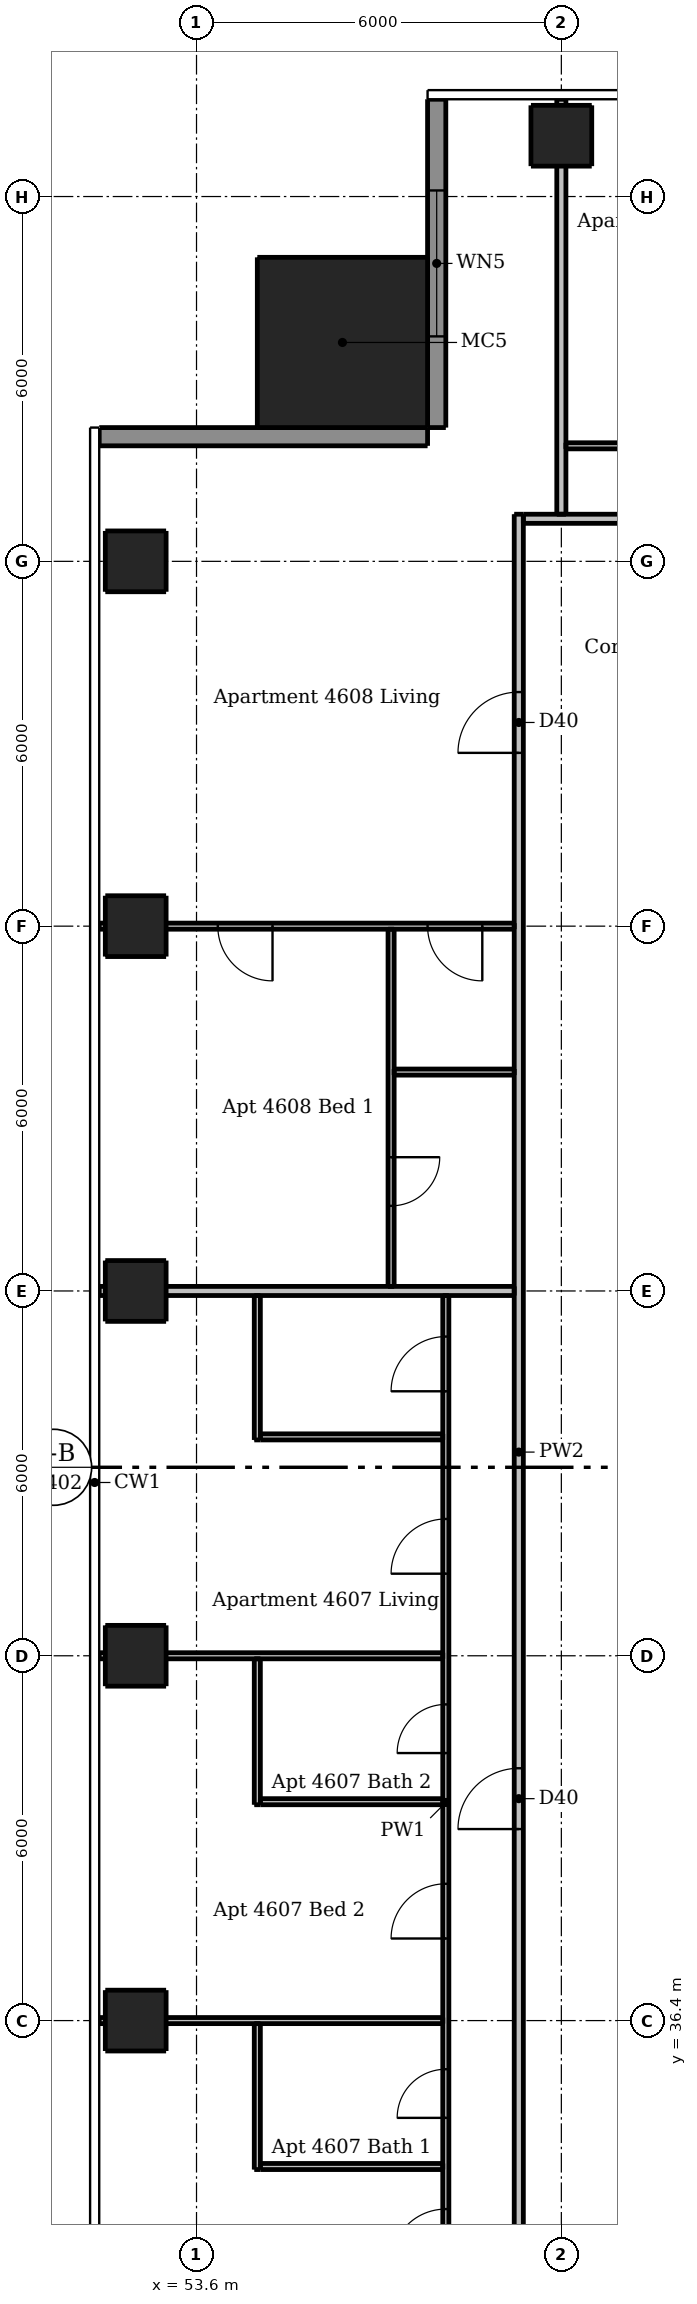
"""IFC4 building model, lengths in metres.
Left out: names, types, materials, properties, quantities, classifications, styles, units other than length and angle.
Written with IfcOpenShell. Run it as: python <this file> out.ifc"""

import sys

from ifc_helpers import new_model, si_unit, direction, frame, frame_2d, origin, origin_2d, place, context, subcontext, project, spatial, rectangle, extrude, element, fill, save


model = new_model("IFC4")
c1 = context("Model", 3, precision=1e-05, world=origin(), true_north=direction((0.0, 1.0)))
c2 = subcontext(c1, "Body", "Model", "MODEL_VIEW")
j1 = project(units=[si_unit("LENGTHUNIT", "METRE"), si_unit("PLANEANGLEUNIT", "RADIAN")], contexts=[c1])
p1 = place(None, origin())
s1 = spatial("IfcSite", under=j1, at=p1, CompositionType="ELEMENT")
p2 = place(p1, origin())
s2 = spatial("IfcBuilding", under=s1, at=p2, CompositionType="ELEMENT")
p3 = place(p2, frame((0.0, 0.0, 171.4)))
s3 = spatial("IfcBuildingStorey", under=s2, at=p3, CompositionType="ELEMENT", Elevation=171.4)
for number, where, z_axis, x_axis in (
    (1, (59.6, 67.4, 0.0), (0.0, 0.0, 1.0), (1.0, 0.0, 0.0)),
    (2, (52.6, 36.4, 0.0), (0.0, 0.0, 1.0), (1.0, 0.0, 0.0)),
    (3, (52.6, 42.4, 0.0), (0.0, 0.0, 1.0), (1.0, 0.0, 0.0)),
    (4, (52.6, 48.4, 0.0), (0.0, 0.0, 1.0), (1.0, 0.0, 0.0)),
    (5, (52.6, 54.4, 0.0), (0.0, 0.0, 1.0), (1.0, 0.0, 0.0)),
    (6, (52.6, 60.4, 0.0), (0.0, 0.0, 1.0), (1.0, 0.0, 0.0)),
):
    element("IfcColumn", number, at=place(p3, frame(where, z_axis=z_axis, x_axis=x_axis)), inside=s3, PredefinedType="COLUMN", context=c2, shape_type="SweptSolid", body=[
        extrude(rectangle(XDim=1.0, YDim=1.0, at=origin_2d()), origin(), (0.0, 0.0, 1.0), 3.05),
    ])
p4 = place(p3, frame((56.0, 64.0, 0.0), z_axis=(0.0, 0.0, 1.0), x_axis=(1.0, 0.0, 0.0)))
e7 = element("IfcColumn", 7, at=p4, inside=s3, PredefinedType="COLUMN", context=c2, shape_type="SweptSolid", body=[
    extrude(rectangle(XDim=2.8, YDim=2.8, at=origin_2d()), origin(), (0.0, 0.0, 1.0), 3.3),
])
p5 = place(p3, frame((57.55, 68.0, 0.0), z_axis=(0.0, 0.0, 1.0), x_axis=(0.0, -1.0, 0.0)))
e8 = element("IfcWall", 8, at=p5, inside=s3, PredefinedType="SOLIDWALL", context=c2, shape_type="SweptSolid", body=[
    extrude(rectangle(XDim=5.4, YDim=0.3, at=frame_2d((2.7, 0.0))), origin(), (0.0, 0.0, 1.0), 3.05),
])
p6 = place(p5, frame((1.5, 0.0, 0.15)))
e9 = element("IfcOpeningElement", 9, at=p6, cuts=e8, PredefinedType="OPENING", context=c2, shape_type="SweptSolid", body=[
    extrude(rectangle(XDim=2.4, YDim=2.1, at=frame_2d((1.2, 1.05))), frame((0.0, 0.16, 0.0), z_axis=(0.0, -1.0, 0.0), x_axis=(1.0, 0.0, 0.0)), (0.0, 0.0, 1.0), 0.32),
])
p7 = place(p3, frame((57.4, 62.45, 0.0), z_axis=(0.0, 0.0, 1.0), x_axis=(-1.0, 0.0, 0.0)))
e10 = element("IfcWall", 10, at=p7, inside=s3, PredefinedType="SOLIDWALL", context=c2, shape_type="SweptSolid", body=[
    extrude(rectangle(XDim=5.4, YDim=0.3, at=frame_2d((2.7, 0.0))), origin(), (0.0, 0.0, 1.0), 3.05),
])
for number, where, z_axis, x_axis in (
    (11, (54.6, 33.95, 0.0), (0.0, 0.0, 1.0), (0.0, 1.0, 0.0)),
    (12, (54.6, 39.95, 0.0), (0.0, 0.0, 1.0), (0.0, 1.0, 0.0)),
):
    element("IfcWall", number, at=place(p3, frame(where, z_axis=z_axis, x_axis=x_axis)), inside=s3, PredefinedType="PARTITIONING", context=c2, shape_type="SweptSolid", body=[
        extrude(rectangle(XDim=2.4, YDim=0.1, at=frame_2d((1.2, 0.0))), origin(), (0.0, 0.0, 1.0), 3.05),
    ])
p8 = place(p3, frame((54.6, 45.95, 0.0), z_axis=(0.0, 0.0, 1.0), x_axis=(0.0, 1.0, 0.0)))
e13 = element("IfcWall", 13, at=p8, inside=s3, PredefinedType="PARTITIONING", context=c2, shape_type="SweptSolid", body=[
    extrude(rectangle(XDim=2.375, YDim=0.1, at=frame_2d((1.188, 0.0))), origin(), (0.0, 0.0, 1.0), 3.05),
])
p9 = place(p3, frame((56.8, 54.35, 0.0), z_axis=(0.0, 0.0, 1.0), x_axis=(0.0, -1.0, 0.0)))
e14 = element("IfcWall", 14, at=p9, inside=s3, PredefinedType="PARTITIONING", context=c2, shape_type="SweptSolid", body=[
    extrude(rectangle(XDim=5.875, YDim=0.1, at=frame_2d((2.938, 0.0))), origin(), (0.0, 0.0, 1.0), 3.05),
])
p10 = place(p9, frame((3.75, 0.0, 0.0)))
e15 = element("IfcOpeningElement", 15, at=p10, cuts=e14, PredefinedType="OPENING", context=c2, shape_type="SweptSolid", body=[
    extrude(rectangle(XDim=0.8, YDim=2.1, at=frame_2d((0.4, 1.05))), frame((0.0, 0.06, 0.0), z_axis=(0.0, -1.0, 0.0), x_axis=(1.0, 0.0, 0.0)), (0.0, 0.0, 1.0), 0.12),
])
p11 = place(p3, frame((57.7, 31.65, 0.0), z_axis=(0.0, 0.0, 1.0), x_axis=(0.0, 1.0, 0.0)))
e16 = element("IfcWall", 16, at=p11, inside=s3, PredefinedType="PARTITIONING", context=c2, shape_type="SweptSolid", body=[
    extrude(rectangle(XDim=16.675, YDim=0.1, at=frame_2d((8.337, 0.0))), origin(), (0.0, 0.0, 1.0), 3.05),
])
p12 = place(p11, frame((12.1, 0.0, 0.0)))
e17 = element("IfcOpeningElement", 17, at=p12, cuts=e16, PredefinedType="OPENING", context=c2, shape_type="SweptSolid", body=[
    extrude(rectangle(XDim=0.9, YDim=2.1, at=frame_2d((0.45, 1.05))), frame((0.0, 0.06, 0.0), z_axis=(0.0, -1.0, 0.0), x_axis=(1.0, 0.0, 0.0)), (0.0, 0.0, 1.0), 0.12),
])
p13 = place(p11, frame((15.1, 0.0, 0.0)))
e18 = element("IfcOpeningElement", 18, at=p13, cuts=e16, PredefinedType="OPENING", context=c2, shape_type="SweptSolid", body=[
    extrude(rectangle(XDim=0.9, YDim=2.1, at=frame_2d((0.45, 1.05))), frame((0.0, 0.06, 0.0), z_axis=(0.0, -1.0, 0.0), x_axis=(1.0, 0.0, 0.0)), (0.0, 0.0, 1.0), 0.12),
])
p14 = place(p11, frame((0.75, 0.0, 0.0)))
e19 = element("IfcOpeningElement", 19, at=p14, cuts=e16, PredefinedType="OPENING", context=c2, shape_type="SweptSolid", body=[
    extrude(rectangle(XDim=0.9, YDim=2.1, at=frame_2d((0.45, 1.05))), frame((0.0, 0.06, 0.0), z_axis=(0.0, -1.0, 0.0), x_axis=(1.0, 0.0, 0.0)), (0.0, 0.0, 1.0), 0.12),
])
p15 = place(p11, frame((6.1, 0.0, 0.0)))
e20 = element("IfcOpeningElement", 20, at=p15, cuts=e16, PredefinedType="OPENING", context=c2, shape_type="SweptSolid", body=[
    extrude(rectangle(XDim=0.9, YDim=2.1, at=frame_2d((0.45, 1.05))), frame((0.0, 0.06, 0.0), z_axis=(0.0, -1.0, 0.0), x_axis=(1.0, 0.0, 0.0)), (0.0, 0.0, 1.0), 0.12),
])
p16 = place(p11, frame((3.15, 0.0, 0.0)))
e21 = element("IfcOpeningElement", 21, at=p16, cuts=e16, PredefinedType="OPENING", context=c2, shape_type="SweptSolid", body=[
    extrude(rectangle(XDim=0.8, YDim=2.1, at=frame_2d((0.4, 1.05))), frame((0.0, 0.06, 0.0), z_axis=(0.0, -1.0, 0.0), x_axis=(1.0, 0.0, 0.0)), (0.0, 0.0, 1.0), 0.12),
])
p17 = place(p11, frame((9.15, 0.0, 0.0)))
e22 = element("IfcOpeningElement", 22, at=p17, cuts=e16, PredefinedType="OPENING", context=c2, shape_type="SweptSolid", body=[
    extrude(rectangle(XDim=0.8, YDim=2.1, at=frame_2d((0.4, 1.05))), frame((0.0, 0.06, 0.0), z_axis=(0.0, -1.0, 0.0), x_axis=(1.0, 0.0, 0.0)), (0.0, 0.0, 1.0), 0.12),
])
p18 = place(p3, frame((59.675, 62.3, 0.0), z_axis=(0.0, 0.0, 1.0), x_axis=(1.0, 0.0, 0.0)))
e23 = element("IfcWall", 23, at=p18, inside=s3, PredefinedType="PARTITIONING", context=c2, shape_type="SweptSolid", body=[
    extrude(rectangle(XDim=17.85, YDim=0.1, at=frame_2d((8.925, 0.0))), origin(), (0.0, 0.0, 1.0), 3.05),
])
p19 = place(p18, frame((13.275, 0.0, 0.0)))
e24 = element("IfcOpeningElement", 24, at=p19, cuts=e23, PredefinedType="OPENING", context=c2, shape_type="SweptSolid", body=[
    extrude(rectangle(XDim=0.9, YDim=2.1, at=frame_2d((0.45, 1.05))), frame((0.0, 0.06, 0.0), z_axis=(0.0, -1.0, 0.0), x_axis=(1.0, 0.0, 0.0)), (0.0, 0.0, 1.0), 0.12),
])
p20 = place(p18, frame((16.275, 0.0, 0.0)))
e25 = element("IfcOpeningElement", 25, at=p20, cuts=e23, PredefinedType="OPENING", context=c2, shape_type="SweptSolid", body=[
    extrude(rectangle(XDim=0.9, YDim=2.1, at=frame_2d((0.45, 1.05))), frame((0.0, 0.06, 0.0), z_axis=(0.0, -1.0, 0.0), x_axis=(1.0, 0.0, 0.0)), (0.0, 0.0, 1.0), 0.12),
])
p21 = place(p18, frame((1.275, 0.0, 0.0)))
e26 = element("IfcOpeningElement", 26, at=p21, cuts=e23, PredefinedType="OPENING", context=c2, shape_type="SweptSolid", body=[
    extrude(rectangle(XDim=0.9, YDim=2.1, at=frame_2d((0.45, 1.05))), frame((0.0, 0.06, 0.0), z_axis=(0.0, -1.0, 0.0), x_axis=(1.0, 0.0, 0.0)), (0.0, 0.0, 1.0), 0.12),
])
p22 = place(p18, frame((7.275, 0.0, 0.0)))
e27 = element("IfcOpeningElement", 27, at=p22, cuts=e23, PredefinedType="OPENING", context=c2, shape_type="SweptSolid", body=[
    extrude(rectangle(XDim=0.9, YDim=2.1, at=frame_2d((0.45, 1.05))), frame((0.0, 0.06, 0.0), z_axis=(0.0, -1.0, 0.0), x_axis=(1.0, 0.0, 0.0)), (0.0, 0.0, 1.0), 0.12),
])
p23 = place(p18, frame((4.325, 0.0, 0.0)))
e28 = element("IfcOpeningElement", 28, at=p23, cuts=e23, PredefinedType="OPENING", context=c2, shape_type="SweptSolid", body=[
    extrude(rectangle(XDim=0.8, YDim=2.1, at=frame_2d((0.4, 1.05))), frame((0.0, 0.06, 0.0), z_axis=(0.0, -1.0, 0.0), x_axis=(1.0, 0.0, 0.0)), (0.0, 0.0, 1.0), 0.12),
])
p24 = place(p18, frame((10.325, 0.0, 0.0)))
e29 = element("IfcOpeningElement", 29, at=p24, cuts=e23, PredefinedType="OPENING", context=c2, shape_type="SweptSolid", body=[
    extrude(rectangle(XDim=0.8, YDim=2.1, at=frame_2d((0.4, 1.05))), frame((0.0, 0.06, 0.0), z_axis=(0.0, -1.0, 0.0), x_axis=(1.0, 0.0, 0.0)), (0.0, 0.0, 1.0), 0.12),
])
p25 = place(p3, frame((58.825, 54.4, 0.0), z_axis=(0.0, 0.0, 1.0), x_axis=(-1.0, 0.0, 0.0)))
e30 = element("IfcWall", 30, at=p25, inside=s3, PredefinedType="PARTITIONING", context=c2, shape_type="SweptSolid", body=[
    extrude(rectangle(XDim=6.825, YDim=0.1, at=frame_2d((3.413, 0.0))), origin(), (0.0, 0.0, 1.0), 2.516),
])
p26 = place(p25, frame((0.525, 0.0, 0.0)))
e31 = element("IfcOpeningElement", 31, at=p26, cuts=e30, PredefinedType="OPENING", context=c2, shape_type="SweptSolid", body=[
    extrude(rectangle(XDim=0.9, YDim=2.1, at=frame_2d((0.45, 1.05))), frame((0.0, 0.06, 0.0), z_axis=(0.0, -1.0, 0.0), x_axis=(1.0, 0.0, 0.0)), (0.0, 0.0, 1.0), 0.12),
])
p27 = place(p25, frame((3.975, 0.0, 0.0)))
e32 = element("IfcOpeningElement", 32, at=p27, cuts=e30, PredefinedType="OPENING", context=c2, shape_type="SweptSolid", body=[
    extrude(rectangle(XDim=0.9, YDim=2.1, at=frame_2d((0.45, 1.05))), frame((0.0, 0.06, 0.0), z_axis=(0.0, -1.0, 0.0), x_axis=(1.0, 0.0, 0.0)), (0.0, 0.0, 1.0), 0.12),
])
p28 = place(p3, frame((56.85, 52.0, 0.0), z_axis=(0.0, 0.0, 1.0), x_axis=(1.0, 0.0, 0.0)))
e33 = element("IfcWall", 33, at=p28, inside=s3, PredefinedType="PARTITIONING", context=c2, shape_type="SweptSolid", body=[
    extrude(rectangle(XDim=1.975, YDim=0.1, at=frame_2d((0.987, 0.0))), origin(), (0.0, 0.0, 1.0), 3.05),
])
p29 = place(p3, frame((54.65, 46.0, 0.0), z_axis=(0.0, 0.0, 1.0), x_axis=(1.0, 0.0, 0.0)))
e34 = element("IfcWall", 34, at=p29, inside=s3, PredefinedType="PARTITIONING", context=c2, shape_type="SweptSolid", body=[
    extrude(rectangle(XDim=3.0, YDim=0.1, at=frame_2d((1.5, 0.0))), origin(), (0.0, 0.0, 1.0), 3.05),
])
p30 = place(p3, frame((52.0, 42.4, 0.0), z_axis=(0.0, 0.0, 1.0), x_axis=(1.0, 0.0, 0.0)))
e35 = element("IfcWall", 35, at=p30, inside=s3, PredefinedType="PARTITIONING", context=c2, shape_type="SweptSolid", body=[
    extrude(rectangle(XDim=5.65, YDim=0.1, at=frame_2d((2.825, 0.0))), origin(), (0.0, 0.0, 1.0), 2.516),
])
p31 = place(p3, frame((54.65, 40.0, 0.0), z_axis=(0.0, 0.0, 1.0), x_axis=(1.0, 0.0, 0.0)))
e36 = element("IfcWall", 36, at=p31, inside=s3, PredefinedType="PARTITIONING", context=c2, shape_type="SweptSolid", body=[
    extrude(rectangle(XDim=3.0, YDim=0.1, at=frame_2d((1.5, 0.0))), origin(), (0.0, 0.0, 1.0), 3.05),
])
p32 = place(p3, frame((52.0, 36.4, 0.0), z_axis=(0.0, 0.0, 1.0), x_axis=(1.0, 0.0, 0.0)))
e37 = element("IfcWall", 37, at=p32, inside=s3, PredefinedType="PARTITIONING", context=c2, shape_type="SweptSolid", body=[
    extrude(rectangle(XDim=5.65, YDim=0.1, at=frame_2d((2.825, 0.0))), origin(), (0.0, 0.0, 1.0), 2.516),
])
p33 = place(p3, frame((54.65, 34.0, 0.0), z_axis=(0.0, 0.0, 1.0), x_axis=(1.0, 0.0, 0.0)))
e38 = element("IfcWall", 38, at=p33, inside=s3, PredefinedType="PARTITIONING", context=c2, shape_type="SweptSolid", body=[
    extrude(rectangle(XDim=3.0, YDim=0.1, at=frame_2d((1.5, 0.0))), origin(), (0.0, 0.0, 1.0), 3.05),
])
p34 = place(p3, frame((58.9, 30.325, 0.0), z_axis=(0.0, 0.0, 1.0), x_axis=(0.0, 1.0, 0.0)))
e39 = element("IfcWall", 39, at=p34, inside=s3, PredefinedType="PARTITIONING", context=c2, shape_type="SweptSolid", body=[
    extrude(rectangle(XDim=30.85, YDim=0.15, at=frame_2d((15.425, 0.0))), origin(), (0.0, 0.0, 1.0), 3.05),
])
p35 = place(p34, frame((9.225, 0.0, 0.0)))
e40 = element("IfcOpeningElement", 40, at=p35, cuts=e39, PredefinedType="OPENING", context=c2, shape_type="SweptSolid", body=[
    extrude(rectangle(XDim=1.0, YDim=2.1, at=frame_2d((0.5, 1.05))), frame((0.0, 0.085, 0.0), z_axis=(0.0, -1.0, 0.0), x_axis=(1.0, 0.0, 0.0)), (0.0, 0.0, 1.0), 0.17),
])
p36 = place(p34, frame((26.925, 0.0, 0.0)))
e41 = element("IfcOpeningElement", 41, at=p36, cuts=e39, PredefinedType="OPENING", context=c2, shape_type="SweptSolid", body=[
    extrude(rectangle(XDim=1.0, YDim=2.1, at=frame_2d((0.5, 1.05))), frame((0.0, 0.085, 0.0), z_axis=(0.0, -1.0, 0.0), x_axis=(1.0, 0.0, 0.0)), (0.0, 0.0, 1.0), 0.17),
])
p37 = place(p3, frame((59.6, 61.175, 0.0), z_axis=(0.0, 0.0, 1.0), x_axis=(0.0, 1.0, 0.0)))
e42 = element("IfcWall", 42, at=p37, inside=s3, PredefinedType="PARTITIONING", context=c2, shape_type="SweptSolid", body=[
    extrude(rectangle(XDim=6.825, YDim=0.15, at=frame_2d((3.413, 0.0))), origin(), (0.0, 0.0, 1.0), 2.51),
])
p38 = place(p3, frame((58.975, 61.1, 0.0), z_axis=(0.0, 0.0, 1.0), x_axis=(1.0, 0.0, 0.0)))
e43 = element("IfcWall", 43, at=p38, inside=s3, PredefinedType="PARTITIONING", context=c2, shape_type="SweptSolid", body=[
    extrude(rectangle(XDim=29.25, YDim=0.15, at=frame_2d((14.625, 0.0))), origin(), (0.0, 0.0, 1.0), 3.05),
])
p39 = place(p38, frame((9.125, 0.0, 0.0)))
e44 = element("IfcOpeningElement", 44, at=p39, cuts=e43, PredefinedType="OPENING", context=c2, shape_type="SweptSolid", body=[
    extrude(rectangle(XDim=1.0, YDim=2.1, at=frame_2d((0.5, 1.05))), frame((0.0, 0.085, 0.0), z_axis=(0.0, -1.0, 0.0), x_axis=(1.0, 0.0, 0.0)), (0.0, 0.0, 1.0), 0.17),
])
p40 = place(p38, frame((26.475, 0.0, 0.0)))
e45 = element("IfcOpeningElement", 45, at=p40, cuts=e43, PredefinedType="OPENING", context=c2, shape_type="SweptSolid", body=[
    extrude(rectangle(XDim=1.0, YDim=2.1, at=frame_2d((0.5, 1.05))), frame((0.0, 0.085, 0.0), z_axis=(0.0, -1.0, 0.0), x_axis=(1.0, 0.0, 0.0)), (0.0, 0.0, 1.0), 0.17),
])
p41 = place(p3, frame((52.0, 48.4, 0.0), z_axis=(0.0, 0.0, 1.0), x_axis=(1.0, 0.0, 0.0)))
e46 = element("IfcWall", 46, at=p41, inside=s3, PredefinedType="PARTITIONING", context=c2, shape_type="SweptSolid", body=[
    extrude(rectangle(XDim=6.825, YDim=0.15, at=frame_2d((3.413, 0.0))), origin(), (0.0, 0.0, 1.0), 2.516),
])
p42 = place(p6, origin())
e47 = element("IfcWindow", 47, at=p42, inside=s3, PartitioningType="DOUBLE_PANEL_VERTICAL", PredefinedType="WINDOW", context=c2, shape_type="SweptSolid", body=[
    extrude(rectangle(XDim=2.4, YDim=2.1, at=frame_2d((1.2, 1.05))), frame((0.0, 0.03, 0.0), z_axis=(0.0, -1.0, 0.0), x_axis=(1.0, 0.0, 0.0)), (0.0, 0.0, 1.0), 0.06),
])
fill(e9, e47)
p43 = place(p35, origin())
e48 = element("IfcDoor", 48, at=p43, inside=s3, OperationType="SINGLE_SWING_LEFT", PredefinedType="DOOR", context=c2, shape_type="SweptSolid", body=[
    extrude(rectangle(XDim=1.0, YDim=2.1, at=frame_2d((0.5, 1.05))), frame((0.0, 0.025, 0.0), z_axis=(0.0, -1.0, 0.0), x_axis=(1.0, 0.0, 0.0)), (0.0, 0.0, 1.0), 0.05),
])
fill(e40, e48)
p44 = place(p12, origin())
e49 = element("IfcDoor", 49, at=p44, inside=s3, OperationType="SINGLE_SWING_LEFT", PredefinedType="DOOR", context=c2, shape_type="SweptSolid", body=[
    extrude(rectangle(XDim=0.9, YDim=2.1, at=frame_2d((0.45, 1.05))), frame((0.0, 0.025, 0.0), z_axis=(0.0, -1.0, 0.0), x_axis=(1.0, 0.0, 0.0)), (0.0, 0.0, 1.0), 0.05),
])
fill(e17, e49)
p45 = place(p13, origin())
e50 = element("IfcDoor", 50, at=p45, inside=s3, OperationType="SINGLE_SWING_LEFT", PredefinedType="DOOR", context=c2, shape_type="SweptSolid", body=[
    extrude(rectangle(XDim=0.9, YDim=2.1, at=frame_2d((0.45, 1.05))), frame((0.0, 0.025, 0.0), z_axis=(0.0, -1.0, 0.0), x_axis=(1.0, 0.0, 0.0)), (0.0, 0.0, 1.0), 0.05),
])
fill(e18, e50)
p46 = place(p14, origin())
e51 = element("IfcDoor", 51, at=p46, inside=s3, OperationType="SINGLE_SWING_LEFT", PredefinedType="DOOR", context=c2, shape_type="SweptSolid", body=[
    extrude(rectangle(XDim=0.9, YDim=2.1, at=frame_2d((0.45, 1.05))), frame((0.0, 0.025, 0.0), z_axis=(0.0, -1.0, 0.0), x_axis=(1.0, 0.0, 0.0)), (0.0, 0.0, 1.0), 0.05),
])
fill(e19, e51)
p47 = place(p15, origin())
e52 = element("IfcDoor", 52, at=p47, inside=s3, OperationType="SINGLE_SWING_LEFT", PredefinedType="DOOR", context=c2, shape_type="SweptSolid", body=[
    extrude(rectangle(XDim=0.9, YDim=2.1, at=frame_2d((0.45, 1.05))), frame((0.0, 0.025, 0.0), z_axis=(0.0, -1.0, 0.0), x_axis=(1.0, 0.0, 0.0)), (0.0, 0.0, 1.0), 0.05),
])
fill(e20, e52)
p48 = place(p16, origin())
e53 = element("IfcDoor", 53, at=p48, inside=s3, OperationType="SINGLE_SWING_LEFT", PredefinedType="DOOR", context=c2, shape_type="SweptSolid", body=[
    extrude(rectangle(XDim=0.8, YDim=2.1, at=frame_2d((0.4, 1.05))), frame((0.0, 0.025, 0.0), z_axis=(0.0, -1.0, 0.0), x_axis=(1.0, 0.0, 0.0)), (0.0, 0.0, 1.0), 0.05),
])
fill(e21, e53)
p49 = place(p17, origin())
e54 = element("IfcDoor", 54, at=p49, inside=s3, OperationType="SINGLE_SWING_LEFT", PredefinedType="DOOR", context=c2, shape_type="SweptSolid", body=[
    extrude(rectangle(XDim=0.8, YDim=2.1, at=frame_2d((0.4, 1.05))), frame((0.0, 0.025, 0.0), z_axis=(0.0, -1.0, 0.0), x_axis=(1.0, 0.0, 0.0)), (0.0, 0.0, 1.0), 0.05),
])
fill(e22, e54)
p50 = place(p36, origin())
e55 = element("IfcDoor", 55, at=p50, inside=s3, OperationType="SINGLE_SWING_LEFT", PredefinedType="DOOR", context=c2, shape_type="SweptSolid", body=[
    extrude(rectangle(XDim=1.0, YDim=2.1, at=frame_2d((0.5, 1.05))), frame((0.0, 0.025, 0.0), z_axis=(0.0, -1.0, 0.0), x_axis=(1.0, 0.0, 0.0)), (0.0, 0.0, 1.0), 0.05),
])
fill(e41, e55)
p51 = place(p26, origin())
e56 = element("IfcDoor", 56, at=p51, inside=s3, OperationType="SINGLE_SWING_LEFT", PredefinedType="DOOR", context=c2, shape_type="SweptSolid", body=[
    extrude(rectangle(XDim=0.9, YDim=2.1, at=frame_2d((0.45, 1.05))), frame((0.0, 0.025, 0.0), z_axis=(0.0, -1.0, 0.0), x_axis=(1.0, 0.0, 0.0)), (0.0, 0.0, 1.0), 0.05),
])
fill(e31, e56)
p52 = place(p27, origin())
e57 = element("IfcDoor", 57, at=p52, inside=s3, OperationType="SINGLE_SWING_LEFT", PredefinedType="DOOR", context=c2, shape_type="SweptSolid", body=[
    extrude(rectangle(XDim=0.9, YDim=2.1, at=frame_2d((0.45, 1.05))), frame((0.0, 0.025, 0.0), z_axis=(0.0, -1.0, 0.0), x_axis=(1.0, 0.0, 0.0)), (0.0, 0.0, 1.0), 0.05),
])
fill(e32, e57)
p53 = place(p10, origin())
e58 = element("IfcDoor", 58, at=p53, inside=s3, OperationType="SINGLE_SWING_LEFT", PredefinedType="DOOR", context=c2, shape_type="SweptSolid", body=[
    extrude(rectangle(XDim=0.8, YDim=2.1, at=frame_2d((0.4, 1.05))), frame((0.0, 0.025, 0.0), z_axis=(0.0, -1.0, 0.0), x_axis=(1.0, 0.0, 0.0)), (0.0, 0.0, 1.0), 0.05),
])
fill(e15, e58)
save(model, sys.argv[1])
